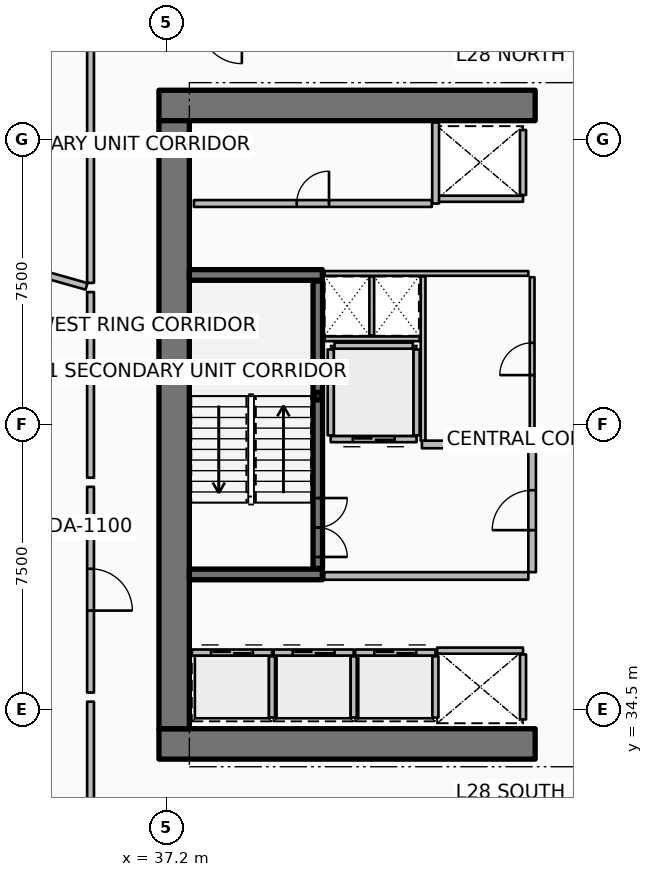
"""IFC4 building model, lengths in metres.
Left out: names, types, materials, properties, quantities, classifications, styles, units other than length and angle.
Written with IfcOpenShell. Run it as: python <this file> out.ifc"""

import sys

from ifc_helpers import new_model, si_unit, direction, frame, frame_2d, origin, origin_2d, place, context, subcontext, project, spatial, rectangle, hollow_rectangle, extrude, element, fill, save


model = new_model("IFC4")
c1 = context("Model", 3, precision=1e-05, world=origin(), true_north=direction((0.0, 1.0)))
c2 = subcontext(c1, "Body", "Model", "MODEL_VIEW")
j1 = project(units=[si_unit("LENGTHUNIT", "METRE"), si_unit("PLANEANGLEUNIT", "RADIAN")], contexts=[c1])
p1 = place(None, origin())
s1 = spatial("IfcSite", under=j1, at=p1, CompositionType="ELEMENT")
p2 = place(p1, origin())
s2 = spatial("IfcBuilding", under=s1, at=p2, CompositionType="ELEMENT")
p3 = place(p2, frame((0.0, 0.0, 112.65)))
s3 = spatial("IfcBuildingStorey", under=s2, at=p3, CompositionType="ELEMENT", Elevation=112.65)
for number, where, z_axis, x_axis in (
    (1, (37.0, 33.6, 0.0), (0.0, 0.0, 1.0), (1.0, 0.0, 0.0)),
    (2, (37.0, 50.4, 0.0), (0.0, 0.0, 1.0), (1.0, 0.0, 0.0)),
):
    element("IfcWall", number, at=place(p3, frame(where, z_axis=z_axis, x_axis=x_axis)), inside=s3, PredefinedType="SHEAR", context=c2, shape_type="SweptSolid", body=[
        extrude(rectangle(XDim=9.9, YDim=0.8, at=frame_2d((4.95, 0.0))), origin(), (0.0, 0.0, 1.0), 3.75),
    ])
p4 = place(p3, frame((37.4, 34.0, 0.0), z_axis=(0.0, 0.0, 1.0), x_axis=(0.0, 1.0, 0.0)))
e3 = element("IfcWall", 3, at=p4, inside=s3, PredefinedType="SHEAR", context=c2, shape_type="SweptSolid", body=[
    extrude(rectangle(XDim=16.0, YDim=0.8, at=frame_2d((8.0, 0.0))), origin(), (0.0, 0.0, 1.0), 3.75),
])
for number, where, z_axis, x_axis in (
    (4, (37.8, 38.06, 0.0), (0.0, 0.0, 1.0), (1.0, 0.0, 0.0)),
    (5, (37.8, 45.94, 0.0), (0.0, 0.0, 1.0), (1.0, 0.0, 0.0)),
):
    element("IfcWall", number, at=place(p3, frame(where, z_axis=z_axis, x_axis=x_axis)), inside=s3, PredefinedType="SHEAR", context=c2, shape_type="SweptSolid", body=[
        extrude(rectangle(XDim=3.5, YDim=0.28, at=frame_2d((1.75, 0.0))), origin(), (0.0, 0.0, 1.0), 3.75),
    ])
p5 = place(p3, frame((41.18, 42.75, 0.0), z_axis=(0.0, 0.0, 1.0), x_axis=(1.0, 0.0, 0.0)))
e6 = element("IfcColumn", 6, at=p5, inside=s3, PredefinedType="COLUMN", context=c2, shape_type="SweptSolid", body=[
    extrude(hollow_rectangle(XDim=0.2, YDim=0.2, WallThickness=0.01, InnerFilletRadius=0.01, OuterFilletRadius=0.02, at=origin_2d()), origin(), (0.0, 0.0, 1.0), 1.67),
])
p6 = place(p3, frame((41.18, 38.22, 0.0), z_axis=(0.0, 0.0, 1.0), x_axis=(0.0, 1.0, 0.0)))
e7 = element("IfcWall", 7, at=p6, inside=s3, PredefinedType="SOLIDWALL", context=c2, shape_type="SweptSolid", body=[
    extrude(rectangle(XDim=7.56, YDim=0.25, at=frame_2d((3.78, 0.0))), origin(), (0.0, 0.0, 1.0), 3.47),
])
p7 = place(p6, frame((0.3, 0.0, 0.0)))
e8 = element("IfcOpeningElement", 8, at=p7, cuts=e7, PredefinedType="OPENING", context=c2, shape_type="SweptSolid", body=[
    extrude(rectangle(XDim=1.55, YDim=2.15, at=frame_2d((0.775, 1.075))), frame((0.0, 0.135, 0.0), z_axis=(0.0, -1.0, 0.0), x_axis=(1.0, 0.0, 0.0)), (0.0, 0.0, 1.0), 0.27),
])
p8 = place(p3, frame((37.865, 36.005, 0.0), z_axis=(0.0, 0.0, 1.0), x_axis=(1.0, 0.0, 0.0)))
e9 = element("IfcWall", 9, at=p8, inside=s3, PredefinedType="PARTITIONING", context=c2, shape_type="SweptSolid", body=[
    extrude(rectangle(XDim=2.11, YDim=0.16, at=frame_2d((1.055, 0.0))), origin(), (0.0, 0.0, 1.0), 3.47),
])
p9 = place(p8, frame((0.505, 0.0, 0.0)))
e10 = element("IfcOpeningElement", 10, at=p9, cuts=e9, PredefinedType="OPENING", context=c2, shape_type="SweptSolid", body=[
    extrude(rectangle(XDim=1.1, YDim=2.1, at=frame_2d((0.55, 1.05))), frame((0.0, 0.09, 0.0), z_axis=(0.0, -1.0, 0.0), x_axis=(1.0, 0.0, 0.0)), (0.0, 0.0, 1.0), 0.18),
])
p10 = place(p3, frame((39.975, 34.295, 0.0), z_axis=(0.0, 0.0, 1.0), x_axis=(0.0, 1.0, 0.0)))
e11 = element("IfcWall", 11, at=p10, inside=s3, PredefinedType="PARTITIONING", context=c2, shape_type="SweptSolid", body=[
    extrude(rectangle(XDim=1.61, YDim=0.16, at=frame_2d((0.805, 0.0))), origin(), (0.0, 0.0, 1.0), 3.47),
])
p11 = place(p3, frame((40.015, 36.005, 0.0), z_axis=(0.0, 0.0, 1.0), x_axis=(1.0, 0.0, 0.0)))
e12 = element("IfcWall", 12, at=p11, inside=s3, PredefinedType="PARTITIONING", context=c2, shape_type="SweptSolid", body=[
    extrude(rectangle(XDim=2.11, YDim=0.16, at=frame_2d((1.055, 0.0))), origin(), (0.0, 0.0, 1.0), 3.47),
])
p12 = place(p11, frame((0.505, 0.0, 0.0)))
e13 = element("IfcOpeningElement", 13, at=p12, cuts=e12, PredefinedType="OPENING", context=c2, shape_type="SweptSolid", body=[
    extrude(rectangle(XDim=1.1, YDim=2.1, at=frame_2d((0.55, 1.05))), frame((0.0, 0.09, 0.0), z_axis=(0.0, -1.0, 0.0), x_axis=(1.0, 0.0, 0.0)), (0.0, 0.0, 1.0), 0.18),
])
p13 = place(p3, frame((42.125, 34.295, 0.0), z_axis=(0.0, 0.0, 1.0), x_axis=(0.0, 1.0, 0.0)))
e14 = element("IfcWall", 14, at=p13, inside=s3, PredefinedType="PARTITIONING", context=c2, shape_type="SweptSolid", body=[
    extrude(rectangle(XDim=1.61, YDim=0.16, at=frame_2d((0.805, 0.0))), origin(), (0.0, 0.0, 1.0), 3.47),
])
p14 = place(p3, frame((42.165, 36.005, 0.0), z_axis=(0.0, 0.0, 1.0), x_axis=(1.0, 0.0, 0.0)))
e15 = element("IfcWall", 15, at=p14, inside=s3, PredefinedType="PARTITIONING", context=c2, shape_type="SweptSolid", body=[
    extrude(rectangle(XDim=2.11, YDim=0.16, at=frame_2d((1.055, 0.0))), origin(), (0.0, 0.0, 1.0), 3.47),
])
p15 = place(p14, frame((0.505, 0.0, 0.0)))
e16 = element("IfcOpeningElement", 16, at=p15, cuts=e15, PredefinedType="OPENING", context=c2, shape_type="SweptSolid", body=[
    extrude(rectangle(XDim=1.1, YDim=2.1, at=frame_2d((0.55, 1.05))), frame((0.0, 0.09, 0.0), z_axis=(0.0, -1.0, 0.0), x_axis=(1.0, 0.0, 0.0)), (0.0, 0.0, 1.0), 0.18),
])
p16 = place(p3, frame((44.275, 34.295, 0.0), z_axis=(0.0, 0.0, 1.0), x_axis=(0.0, 1.0, 0.0)))
e17 = element("IfcWall", 17, at=p16, inside=s3, PredefinedType="PARTITIONING", context=c2, shape_type="SweptSolid", body=[
    extrude(rectangle(XDim=1.61, YDim=0.16, at=frame_2d((0.805, 0.0))), origin(), (0.0, 0.0, 1.0), 3.47),
])
p17 = place(p3, frame((46.58, 47.945, 0.0), z_axis=(0.0, 0.0, 1.0), x_axis=(-1.0, 0.0, 0.0)))
e18 = element("IfcWall", 18, at=p17, inside=s3, PredefinedType="PARTITIONING", context=c2, shape_type="SweptSolid", body=[
    extrude(rectangle(XDim=2.26, YDim=0.16, at=frame_2d((1.13, 0.0))), origin(), (0.0, 0.0, 1.0), 3.47),
])
p18 = place(p3, frame((46.58, 48.045, 0.0), z_axis=(0.0, 0.0, 1.0), x_axis=(0.0, 1.0, 0.0)))
e19 = element("IfcWall", 19, at=p18, inside=s3, PredefinedType="PARTITIONING", context=c2, shape_type="SweptSolid", body=[
    extrude(rectangle(XDim=1.71, YDim=0.16, at=frame_2d((0.855, 0.0))), origin(), (0.0, 0.0, 1.0), 3.47),
])
p19 = place(p3, frame((44.32, 36.055, 0.0), z_axis=(0.0, 0.0, 1.0), x_axis=(1.0, 0.0, 0.0)))
e20 = element("IfcWall", 20, at=p19, inside=s3, PredefinedType="PARTITIONING", context=c2, shape_type="SweptSolid", body=[
    extrude(rectangle(XDim=2.26, YDim=0.16, at=frame_2d((1.13, 0.0))), origin(), (0.0, 0.0, 1.0), 3.47),
])
p20 = place(p3, frame((46.58, 34.245, 0.0), z_axis=(0.0, 0.0, 1.0), x_axis=(0.0, 1.0, 0.0)))
e21 = element("IfcWall", 21, at=p20, inside=s3, PredefinedType="PARTITIONING", context=c2, shape_type="SweptSolid", body=[
    extrude(rectangle(XDim=1.71, YDim=0.16, at=frame_2d((0.855, 0.0))), origin(), (0.0, 0.0, 1.0), 3.47),
])
p21 = place(p3, frame((43.78, 41.62, 0.0), z_axis=(0.0, 0.0, 1.0), x_axis=(-1.0, 0.0, 0.0)))
e22 = element("IfcWall", 22, at=p21, inside=s3, PredefinedType="PARTITIONING", context=c2, shape_type="SweptSolid", body=[
    extrude(rectangle(XDim=2.26, YDim=0.16, at=frame_2d((1.13, 0.0))), origin(), (0.0, 0.0, 1.0), 3.47),
])
p22 = place(p21, frame((0.58, 0.0, 0.0)))
e23 = element("IfcOpeningElement", 23, at=p22, cuts=e22, PredefinedType="OPENING", context=c2, shape_type="SweptSolid", body=[
    extrude(rectangle(XDim=1.1, YDim=2.1, at=frame_2d((0.55, 1.05))), frame((0.0, 0.09, 0.0), z_axis=(0.0, -1.0, 0.0), x_axis=(1.0, 0.0, 0.0)), (0.0, 0.0, 1.0), 0.18),
])
for number, where, z_axis, x_axis in (
    (24, (43.78, 41.72, 0.0), (0.0, 0.0, 1.0), (0.0, 1.0, 0.0)),
    (25, (41.52, 41.72, 0.0), (0.0, 0.0, 1.0), (0.0, 1.0, 0.0)),
):
    element("IfcWall", number, at=place(p3, frame(where, z_axis=z_axis, x_axis=x_axis)), inside=s3, PredefinedType="PARTITIONING", context=c2, shape_type="SweptSolid", body=[
        extrude(rectangle(XDim=2.26, YDim=0.16, at=frame_2d((1.13, 0.0))), origin(), (0.0, 0.0, 1.0), 3.47),
    ])
p23 = place(p3, frame((41.62, 44.08, 0.0), z_axis=(0.0, 0.0, 1.0), x_axis=(1.0, 0.0, 0.0)))
e26 = element("IfcWall", 26, at=p23, inside=s3, PredefinedType="PARTITIONING", context=c2, shape_type="SweptSolid", body=[
    extrude(rectangle(XDim=2.06, YDim=0.16, at=frame_2d((1.03, 0.0))), origin(), (0.0, 0.0, 1.0), 3.47),
])
p24 = place(p3, frame((37.92, 47.82, 0.0), z_axis=(0.0, 0.0, 1.0), x_axis=(1.0, 0.0, 0.0)))
e27 = element("IfcWall", 27, at=p24, inside=s3, PredefinedType="PARTITIONING", context=c2, shape_type="SweptSolid", body=[
    extrude(rectangle(XDim=6.26, YDim=0.18, at=frame_2d((3.13, 0.0))), origin(), (0.0, 0.0, 1.0), 3.47),
])
p25 = place(p24, frame((2.705, 0.0, 0.0)))
e28 = element("IfcOpeningElement", 28, at=p25, cuts=e27, PredefinedType="OPENING", context=c2, shape_type="SweptSolid", body=[
    extrude(rectangle(XDim=0.85, YDim=2.06, at=frame_2d((0.425, 1.03))), frame((0.0, 0.1, 0.0), z_axis=(0.0, -1.0, 0.0), x_axis=(1.0, 0.0, 0.0)), (0.0, 0.0, 1.0), 0.2),
])
p26 = place(p3, frame((44.28, 47.82, 0.0), z_axis=(0.0, 0.0, 1.0), x_axis=(0.0, 1.0, 0.0)))
e29 = element("IfcWall", 29, at=p26, inside=s3, PredefinedType="PARTITIONING", context=c2, shape_type="SweptSolid", body=[
    extrude(rectangle(XDim=2.13, YDim=0.18, at=frame_2d((1.065, 0.0))), origin(), (0.0, 0.0, 1.0), 3.47),
])
p27 = place(p3, frame((41.35, 38.02, 0.0), z_axis=(0.0, 0.0, 1.0), x_axis=(1.0, 0.0, 0.0)))
e30 = element("IfcWall", 30, at=p27, inside=s3, PredefinedType="PARTITIONING", context=c2, shape_type="SweptSolid", body=[
    extrude(rectangle(XDim=5.37, YDim=0.2, at=frame_2d((2.685, 0.0))), origin(), (0.0, 0.0, 1.0), 3.47),
])
p28 = place(p3, frame((43.92, 41.48, 0.0), z_axis=(0.0, 0.0, 1.0), x_axis=(1.0, 0.0, 0.0)))
e31 = element("IfcWall", 31, at=p28, inside=s3, PredefinedType="PARTITIONING", context=c2, shape_type="SweptSolid", body=[
    extrude(rectangle(XDim=2.8, YDim=0.2, at=frame_2d((1.4, 0.0))), origin(), (0.0, 0.0, 1.0), 3.47),
])
p29 = place(p3, frame((46.82, 38.12, 0.0), z_axis=(0.0, 0.0, 1.0), x_axis=(0.0, 1.0, 0.0)))
e32 = element("IfcWall", 32, at=p29, inside=s3, PredefinedType="PARTITIONING", context=c2, shape_type="SweptSolid", body=[
    extrude(rectangle(XDim=3.26, YDim=0.2, at=frame_2d((1.63, 0.0))), origin(), (0.0, 0.0, 1.0), 3.47),
])
p30 = place(p29, frame((1.105, 0.0, 0.0)))
e33 = element("IfcOpeningElement", 33, at=p30, cuts=e32, PredefinedType="OPENING", context=c2, shape_type="SweptSolid", body=[
    extrude(rectangle(XDim=1.05, YDim=2.1, at=frame_2d((0.525, 1.05))), frame((0.0, 0.11, 0.0), z_axis=(0.0, -1.0, 0.0), x_axis=(1.0, 0.0, 0.0)), (0.0, 0.0, 1.0), 0.22),
])
p31 = place(p3, frame((41.36, 45.98, 0.0), z_axis=(0.0, 0.0, 1.0), x_axis=(1.0, 0.0, 0.0)))
e34 = element("IfcWall", 34, at=p31, inside=s3, PredefinedType="PARTITIONING", context=c2, shape_type="SweptSolid", body=[
    extrude(rectangle(XDim=5.36, YDim=0.125, at=frame_2d((2.68, 0.0))), origin(), (0.0, 0.0, 1.0), 2.91),
])
p32 = place(p3, frame((41.36, 44.26, 0.0), z_axis=(0.0, 0.0, 1.0), x_axis=(1.0, 0.0, 0.0)))
e35 = element("IfcWall", 35, at=p32, inside=s3, PredefinedType="PARTITIONING", context=c2, shape_type="SweptSolid", body=[
    extrude(rectangle(XDim=2.5, YDim=0.125, at=frame_2d((1.25, 0.0))), origin(), (0.0, 0.0, 1.0), 2.91),
])
p33 = place(p3, frame((42.6, 44.35, 0.0), z_axis=(0.0, 0.0, 1.0), x_axis=(0.0, 1.0, 0.0)))
e36 = element("IfcWall", 36, at=p33, inside=s3, PredefinedType="PARTITIONING", context=c2, shape_type="SweptSolid", body=[
    extrude(rectangle(XDim=1.55, YDim=0.125, at=frame_2d((0.775, 0.0))), origin(), (0.0, 0.0, 1.0), 2.91),
])
p34 = place(p3, frame((43.95, 41.58, 0.0), z_axis=(0.0, 0.0, 1.0), x_axis=(0.0, 1.0, 0.0)))
e37 = element("IfcWall", 37, at=p34, inside=s3, PredefinedType="PARTITIONING", context=c2, shape_type="SweptSolid", body=[
    extrude(rectangle(XDim=4.32, YDim=0.125, at=frame_2d((2.16, 0.0))), origin(), (0.0, 0.0, 1.0), 2.91),
])
p35 = place(p3, frame((46.82, 41.58, 0.0), z_axis=(0.0, 0.0, 1.0), x_axis=(0.0, 1.0, 0.0)))
e38 = element("IfcWall", 38, at=p35, inside=s3, PredefinedType="PARTITIONING", context=c2, shape_type="SweptSolid", body=[
    extrude(rectangle(XDim=4.3, YDim=0.125, at=frame_2d((2.15, 0.0))), origin(), (0.0, 0.0, 1.0), 2.91),
])
p36 = place(p35, frame((1.725, 0.0, 0.0)))
e39 = element("IfcOpeningElement", 39, at=p36, cuts=e38, PredefinedType="OPENING", context=c2, shape_type="SweptSolid", body=[
    extrude(rectangle(XDim=0.85, YDim=2.06, at=frame_2d((0.425, 1.03))), frame((0.0, 0.073, 0.0), z_axis=(0.0, -1.0, 0.0), x_axis=(1.0, 0.0, 0.0)), (0.0, 0.0, 1.0), 0.145),
])
p37 = place(p3, frame((35.094, 45.64, 0.0), z_axis=(0.0, 0.0, 1.0), x_axis=(-0.962454745894, 0.271442189251, 0.0)))
e40 = element("IfcWall", 40, at=p37, inside=s3, PredefinedType="PARTITIONING", context=c2, shape_type="SweptSolid", body=[
    extrude(rectangle(XDim=15.162, YDim=0.18, at=frame_2d((7.581, 0.0))), origin(), (0.0, 0.0, 1.0), 2.427),
])
p38 = place(p3, frame((35.2, 40.365, 0.0), z_axis=(0.0, 0.0, 1.0), x_axis=(0.0, -1.0, 0.0)))
e41 = element("IfcWall", 41, at=p38, inside=s3, PredefinedType="PARTITIONING", context=c2, shape_type="SweptSolid", body=[
    extrude(rectangle(XDim=5.413, YDim=0.18, at=frame_2d((2.707, 0.0))), origin(), (0.0, 0.0, 1.0), 2.427),
])
p39 = place(p38, frame((2.156, 0.0, 0.0)))
e42 = element("IfcOpeningElement", 42, at=p39, cuts=e41, PredefinedType="OPENING", context=c2, shape_type="SweptSolid", body=[
    extrude(rectangle(XDim=1.1, YDim=2.1, at=frame_2d((0.55, 1.05))), frame((0.0, 0.1, 0.0), z_axis=(0.0, -1.0, 0.0), x_axis=(1.0, 0.0, 0.0)), (0.0, 0.0, 1.0), 0.2),
])
p40 = place(p3, frame((35.2, 45.49, 0.0), z_axis=(0.0, 0.0, 1.0), x_axis=(0.0, -1.0, 0.0)))
e43 = element("IfcWall", 43, at=p40, inside=s3, PredefinedType="PARTITIONING", context=c2, shape_type="SweptSolid", body=[
    extrude(rectangle(XDim=4.885, YDim=0.18, at=frame_2d((2.442, 0.0))), origin(), (0.0, 0.0, 1.0), 2.427),
])
p41 = place(p3, frame((35.2, 34.712, 0.0), z_axis=(0.0, 0.0, 1.0), x_axis=(0.0, -1.0, 0.0)))
e44 = element("IfcWall", 44, at=p41, inside=s3, PredefinedType="PARTITIONING", context=c2, shape_type="SweptSolid", body=[
    extrude(rectangle(XDim=3.192, YDim=0.18, at=frame_2d((1.596, 0.0))), origin(), (0.0, 0.0, 1.0), 2.427),
])
p42 = place(p3, frame((35.2, 51.971, 0.0), z_axis=(0.0, 0.0, 1.0), x_axis=(0.0, -1.0, 0.0)))
e45 = element("IfcWall", 45, at=p42, inside=s3, PredefinedType="PARTITIONING", context=c2, shape_type="SweptSolid", body=[
    extrude(rectangle(XDim=6.241, YDim=0.18, at=frame_2d((3.12, 0.0))), origin(), (0.0, 0.0, 1.0), 2.427),
])
p43 = place(p7, origin())
e46 = element("IfcDoor", 46, at=p43, inside=s3, OperationType="DOUBLE_DOOR_SINGLE_SWING", PredefinedType="DOOR", context=c2, shape_type="SweptSolid", body=[
    extrude(rectangle(XDim=1.55, YDim=2.15, at=frame_2d((0.775, 1.075))), frame((0.0, 0.025, 0.0), z_axis=(0.0, -1.0, 0.0), x_axis=(1.0, 0.0, 0.0)), (0.0, 0.0, 1.0), 0.05),
])
fill(e8, e46)
p44 = place(p9, origin())
e47 = element("IfcDoor", 47, at=p44, inside=s3, OperationType="DOUBLE_DOOR_SLIDING", PredefinedType="DOOR", context=c2, shape_type="SweptSolid", body=[
    extrude(rectangle(XDim=1.1, YDim=2.1, at=frame_2d((0.55, 1.05))), frame((0.0, 0.025, 0.0), z_axis=(0.0, -1.0, 0.0), x_axis=(1.0, 0.0, 0.0)), (0.0, 0.0, 1.0), 0.05),
])
fill(e10, e47)
p45 = place(p12, origin())
e48 = element("IfcDoor", 48, at=p45, inside=s3, OperationType="DOUBLE_DOOR_SLIDING", PredefinedType="DOOR", context=c2, shape_type="SweptSolid", body=[
    extrude(rectangle(XDim=1.1, YDim=2.1, at=frame_2d((0.55, 1.05))), frame((0.0, 0.025, 0.0), z_axis=(0.0, -1.0, 0.0), x_axis=(1.0, 0.0, 0.0)), (0.0, 0.0, 1.0), 0.05),
])
fill(e13, e48)
p46 = place(p15, origin())
e49 = element("IfcDoor", 49, at=p46, inside=s3, OperationType="DOUBLE_DOOR_SLIDING", PredefinedType="DOOR", context=c2, shape_type="SweptSolid", body=[
    extrude(rectangle(XDim=1.1, YDim=2.1, at=frame_2d((0.55, 1.05))), frame((0.0, 0.025, 0.0), z_axis=(0.0, -1.0, 0.0), x_axis=(1.0, 0.0, 0.0)), (0.0, 0.0, 1.0), 0.05),
])
fill(e16, e49)
p47 = place(p22, origin())
e50 = element("IfcDoor", 50, at=p47, inside=s3, OperationType="DOUBLE_DOOR_SLIDING", PredefinedType="DOOR", context=c2, shape_type="SweptSolid", body=[
    extrude(rectangle(XDim=1.1, YDim=2.1, at=frame_2d((0.55, 1.05))), frame((0.0, 0.025, 0.0), z_axis=(0.0, -1.0, 0.0), x_axis=(1.0, 0.0, 0.0)), (0.0, 0.0, 1.0), 0.05),
])
fill(e23, e50)
p48 = place(p25, origin())
e51 = element("IfcDoor", 51, at=p48, inside=s3, OperationType="SINGLE_SWING_RIGHT", PredefinedType="DOOR", context=c2, shape_type="SweptSolid", body=[
    extrude(rectangle(XDim=0.85, YDim=2.06, at=frame_2d((0.425, 1.03))), frame((0.0, 0.025, 0.0), z_axis=(0.0, -1.0, 0.0), x_axis=(1.0, 0.0, 0.0)), (0.0, 0.0, 1.0), 0.05),
])
fill(e28, e51)
p49 = place(p30, origin())
e52 = element("IfcDoor", 52, at=p49, inside=s3, OperationType="SINGLE_SWING_LEFT", PredefinedType="DOOR", context=c2, shape_type="SweptSolid", body=[
    extrude(rectangle(XDim=1.05, YDim=2.1, at=frame_2d((0.525, 1.05))), frame((0.0, 0.025, 0.0), z_axis=(0.0, -1.0, 0.0), x_axis=(1.0, 0.0, 0.0)), (0.0, 0.0, 1.0), 0.05),
])
fill(e33, e52)
p50 = place(p36, origin())
e53 = element("IfcDoor", 53, at=p50, inside=s3, OperationType="SINGLE_SWING_LEFT", PredefinedType="DOOR", context=c2, shape_type="SweptSolid", body=[
    extrude(rectangle(XDim=0.85, YDim=2.06, at=frame_2d((0.425, 1.03))), frame((0.0, 0.025, 0.0), z_axis=(0.0, -1.0, 0.0), x_axis=(1.0, 0.0, 0.0)), (0.0, 0.0, 1.0), 0.05),
])
fill(e39, e53)
p51 = place(p39, origin())
e54 = element("IfcDoor", 54, at=p51, inside=s3, OperationType="SINGLE_SWING_RIGHT", PredefinedType="DOOR", context=c2, shape_type="SweptSolid", body=[
    extrude(rectangle(XDim=1.1, YDim=2.1, at=frame_2d((0.55, 1.05))), frame((0.0, 0.025, 0.0), z_axis=(0.0, -1.0, 0.0), x_axis=(1.0, 0.0, 0.0)), (0.0, 0.0, 1.0), 0.05),
])
fill(e42, e54)
save(model, sys.argv[1])
